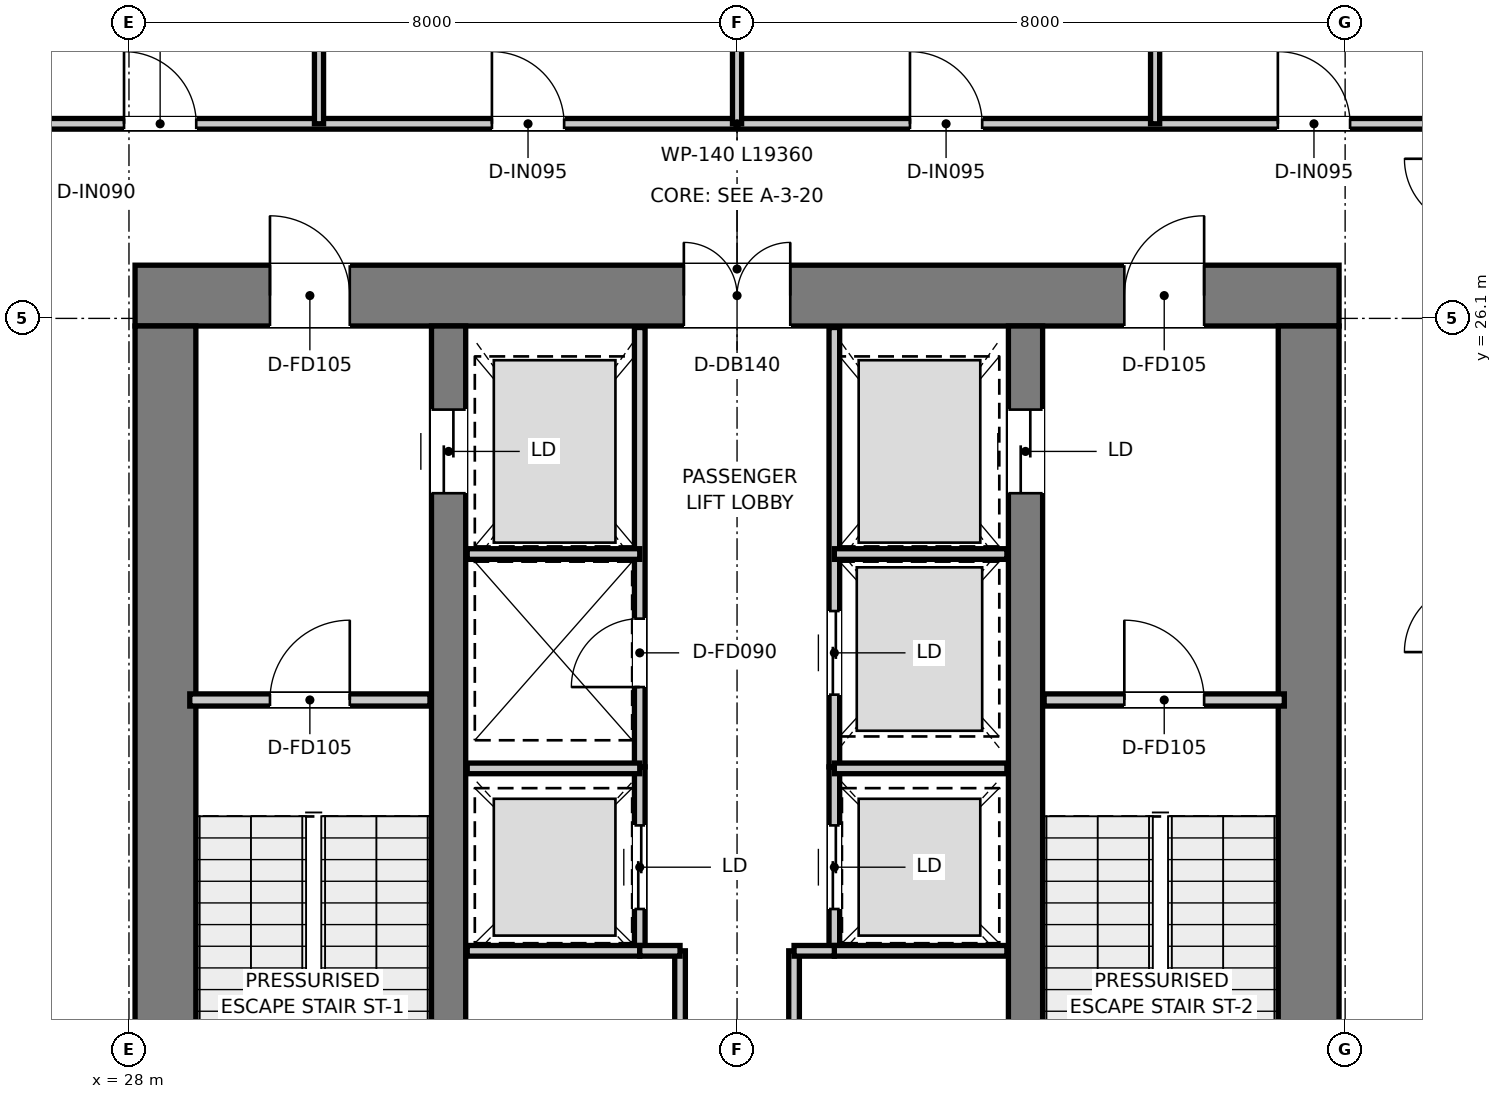
"""IFC4 building model, lengths in metres.
Left out: names, types, materials, properties, quantities, classifications, styles, units other than length and angle.
Written with IfcOpenShell. Run it as: python <this file> out.ifc"""

import sys

from ifc_helpers import new_model, si_unit, direction, frame, frame_2d, origin, place, context, subcontext, project, spatial, rectangle, extrude, element, fill, save


model = new_model("IFC4")
c1 = context("Model", 3, precision=1e-05, world=origin(), true_north=direction((0.0, 1.0)))
c2 = subcontext(c1, "Body", "Model", "MODEL_VIEW")
j1 = project(units=[si_unit("LENGTHUNIT", "METRE"), si_unit("PLANEANGLEUNIT", "RADIAN")], contexts=[c1])
p1 = place(None, origin())
s1 = spatial("IfcSite", under=j1, at=p1, CompositionType="ELEMENT")
p2 = place(p1, origin())
s2 = spatial("IfcBuilding", under=s1, at=p2, CompositionType="ELEMENT")
p3 = place(p2, frame((0.0, 0.0, 302.95)))
s3 = spatial("IfcBuildingStorey", under=s2, at=p3, CompositionType="ELEMENT", Elevation=302.95)
p4 = place(p3, frame((28.08, 26.4, 0.0), z_axis=(0.0, 0.0, 1.0), x_axis=(1.0, 0.0, 0.0)))
e1 = element("IfcWall", 1, at=p4, inside=s3, PredefinedType="SHEAR", context=c2, shape_type="SweptSolid", body=[
    extrude(rectangle(XDim=15.84, YDim=0.8, at=frame_2d((7.92, 0.0))), origin(), (0.0, 0.0, 1.0), 3.95),
])
p5 = place(p4, frame((7.22, 0.0, 0.0)))
e2 = element("IfcOpeningElement", 2, at=p5, cuts=e1, PredefinedType="OPENING", context=c2, shape_type="SweptSolid", body=[
    extrude(rectangle(XDim=1.4, YDim=2.2, at=frame_2d((0.7, 1.1))), frame((0.0, 0.41, 0.0), z_axis=(0.0, -1.0, 0.0), x_axis=(1.0, 0.0, 0.0)), (0.0, 0.0, 1.0), 0.82),
])
p6 = place(p4, frame((1.775, 0.0, 0.0)))
e3 = element("IfcOpeningElement", 3, at=p6, cuts=e1, PredefinedType="OPENING", context=c2, shape_type="SweptSolid", body=[
    extrude(rectangle(XDim=1.05, YDim=2.1, at=frame_2d((0.525, 1.05))), frame((0.0, 0.41, 0.0), z_axis=(0.0, -1.0, 0.0), x_axis=(1.0, 0.0, 0.0)), (0.0, 0.0, 1.0), 0.82),
])
p7 = place(p4, frame((13.015, 0.0, 0.0)))
e4 = element("IfcOpeningElement", 4, at=p7, cuts=e1, PredefinedType="OPENING", context=c2, shape_type="SweptSolid", body=[
    extrude(rectangle(XDim=1.05, YDim=2.1, at=frame_2d((0.525, 1.05))), frame((0.0, 0.41, 0.0), z_axis=(0.0, -1.0, 0.0), x_axis=(1.0, 0.0, 0.0)), (0.0, 0.0, 1.0), 0.82),
])
for number, where, z_axis, x_axis in (
    (5, (28.48, 11.3, 0.0), (0.0, 0.0, 1.0), (0.0, 1.0, 0.0)),
    (6, (43.52, 11.3, 0.0), (0.0, 0.0, 1.0), (0.0, 1.0, 0.0)),
):
    element("IfcWall", number, at=place(p3, frame(where, z_axis=z_axis, x_axis=x_axis)), inside=s3, PredefinedType="SHEAR", context=c2, shape_type="SweptSolid", body=[
        extrude(rectangle(XDim=14.7, YDim=0.8, at=frame_2d((7.35, 0.0))), origin(), (0.0, 0.0, 1.0), 3.95),
    ])
p8 = place(p3, frame((32.205, 13.22, 0.0), z_axis=(0.0, 0.0, 1.0), x_axis=(0.0, 1.0, 0.0)))
e7 = element("IfcWall", 7, at=p8, inside=s3, PredefinedType="SHEAR", context=c2, shape_type="SweptSolid", body=[
    extrude(rectangle(XDim=12.78, YDim=0.45, at=frame_2d((6.39, 0.0))), origin(), (0.0, 0.0, 1.0), 3.95),
])
p9 = place(p8, frame((10.58, 0.0, 0.0)))
e8 = element("IfcOpeningElement", 8, at=p9, cuts=e7, PredefinedType="OPENING", context=c2, shape_type="SweptSolid", body=[
    extrude(rectangle(XDim=1.1, YDim=2.15, at=frame_2d((0.55, 1.075))), frame((0.0, 0.235, 0.0), z_axis=(0.0, -1.0, 0.0), x_axis=(1.0, 0.0, 0.0)), (0.0, 0.0, 1.0), 0.47),
])
p10 = place(p3, frame((39.795, 13.22, 0.0), z_axis=(0.0, 0.0, 1.0), x_axis=(0.0, 1.0, 0.0)))
e9 = element("IfcWall", 9, at=p10, inside=s3, PredefinedType="SHEAR", context=c2, shape_type="SweptSolid", body=[
    extrude(rectangle(XDim=12.78, YDim=0.45, at=frame_2d((6.39, 0.0))), origin(), (0.0, 0.0, 1.0), 3.95),
])
p11 = place(p10, frame((10.58, 0.0, 0.0)))
e10 = element("IfcOpeningElement", 10, at=p11, cuts=e9, PredefinedType="OPENING", context=c2, shape_type="SweptSolid", body=[
    extrude(rectangle(XDim=1.1, YDim=2.15, at=frame_2d((0.55, 1.075))), frame((0.0, 0.235, 0.0), z_axis=(0.0, -1.0, 0.0), x_axis=(1.0, 0.0, 0.0)), (0.0, 0.0, 1.0), 0.47),
])
p12 = place(p3, frame((28.8, 21.08, 0.0), z_axis=(0.0, 0.0, 1.0), x_axis=(1.0, 0.0, 0.0)))
e11 = element("IfcWall", 11, at=p12, inside=s3, PredefinedType="PARTITIONING", context=c2, shape_type="SweptSolid", body=[
    extrude(rectangle(XDim=3.16, YDim=0.16, at=frame_2d((1.58, 0.0))), origin(), (0.0, 0.0, 1.0), 3.67),
])
p13 = place(p12, frame((1.055, 0.0, 0.0)))
e12 = element("IfcOpeningElement", 12, at=p13, cuts=e11, PredefinedType="OPENING", context=c2, shape_type="SweptSolid", body=[
    extrude(rectangle(XDim=1.05, YDim=2.1, at=frame_2d((0.525, 1.05))), frame((0.0, 0.09, 0.0), z_axis=(0.0, -1.0, 0.0), x_axis=(1.0, 0.0, 0.0)), (0.0, 0.0, 1.0), 0.18),
])
p14 = place(p3, frame((40.04, 21.08, 0.0), z_axis=(0.0, 0.0, 1.0), x_axis=(1.0, 0.0, 0.0)))
e13 = element("IfcWall", 13, at=p14, inside=s3, PredefinedType="PARTITIONING", context=c2, shape_type="SweptSolid", body=[
    extrude(rectangle(XDim=3.16, YDim=0.16, at=frame_2d((1.58, 0.0))), origin(), (0.0, 0.0, 1.0), 3.67),
])
p15 = place(p14, frame((1.055, 0.0, 0.0)))
e14 = element("IfcOpeningElement", 14, at=p15, cuts=e13, PredefinedType="OPENING", context=c2, shape_type="SweptSolid", body=[
    extrude(rectangle(XDim=1.05, YDim=2.1, at=frame_2d((0.525, 1.05))), frame((0.0, 0.09, 0.0), z_axis=(0.0, -1.0, 0.0), x_axis=(1.0, 0.0, 0.0)), (0.0, 0.0, 1.0), 0.18),
])
p16 = place(p3, frame((34.72, 20.2, 0.0), z_axis=(0.0, 0.0, 1.0), x_axis=(0.0, 1.0, 0.0)))
e15 = element("IfcWall", 15, at=p16, inside=s3, PredefinedType="PARTITIONING", context=c2, shape_type="SweptSolid", body=[
    extrude(rectangle(XDim=5.78, YDim=0.14, at=frame_2d((2.89, 0.0))), origin(), (0.0, 0.0, 1.0), 2.82),
])
p17 = place(p16, frame((1.05, 0.0, 0.0)))
e16 = element("IfcOpeningElement", 16, at=p17, cuts=e15, PredefinedType="OPENING", context=c2, shape_type="SweptSolid", body=[
    extrude(rectangle(XDim=0.9, YDim=2.1, at=frame_2d((0.45, 1.05))), frame((0.0, 0.08, 0.0), z_axis=(0.0, -1.0, 0.0), x_axis=(1.0, 0.0, 0.0)), (0.0, 0.0, 1.0), 0.16),
])
p18 = place(p3, frame((37.28, 20.2, 0.0), z_axis=(0.0, 0.0, 1.0), x_axis=(0.0, 1.0, 0.0)))
e17 = element("IfcWall", 17, at=p18, inside=s3, PredefinedType="PARTITIONING", context=c2, shape_type="SweptSolid", body=[
    extrude(rectangle(XDim=5.78, YDim=0.14, at=frame_2d((2.89, 0.0))), origin(), (0.0, 0.0, 1.0), 2.82),
])
p19 = place(p18, frame((0.95, 0.0, 0.0)))
e18 = element("IfcOpeningElement", 18, at=p19, cuts=e17, PredefinedType="OPENING", context=c2, shape_type="SweptSolid", body=[
    extrude(rectangle(XDim=1.1, YDim=2.15, at=frame_2d((0.55, 1.075))), frame((0.0, 0.08, 0.0), z_axis=(0.0, -1.0, 0.0), x_axis=(1.0, 0.0, 0.0)), (0.0, 0.0, 1.0), 0.16),
])
for number, where, z_axis, x_axis in (
    (19, (32.45, 23.0, 0.0), (0.0, 0.0, 1.0), (1.0, 0.0, 0.0)),
    (20, (37.28, 23.0, 0.0), (0.0, 0.0, 1.0), (1.0, 0.0, 0.0)),
):
    element("IfcWall", number, at=place(p3, frame(where, z_axis=z_axis, x_axis=x_axis)), inside=s3, PredefinedType="PARTITIONING", context=c2, shape_type="SweptSolid", body=[
        extrude(rectangle(XDim=2.27, YDim=0.14, at=frame_2d((1.135, 0.0))), origin(), (0.0, 0.0, 1.0), 2.82),
    ])
p20 = place(p3, frame((34.72, 17.78, 0.0), z_axis=(0.0, 0.0, 1.0), x_axis=(0.0, 1.0, 0.0)))
e21 = element("IfcWall", 21, at=p20, inside=s3, PredefinedType="PARTITIONING", context=c2, shape_type="SweptSolid", body=[
    extrude(rectangle(XDim=2.42, YDim=0.14, at=frame_2d((1.21, 0.0))), origin(), (0.0, 0.0, 1.0), 3.67),
])
p21 = place(p20, frame((0.55, 0.0, 0.0)))
e22 = element("IfcOpeningElement", 22, at=p21, cuts=e21, PredefinedType="OPENING", context=c2, shape_type="SweptSolid", body=[
    extrude(rectangle(XDim=1.1, YDim=2.15, at=frame_2d((0.55, 1.075))), frame((0.0, 0.08, 0.0), z_axis=(0.0, -1.0, 0.0), x_axis=(1.0, 0.0, 0.0)), (0.0, 0.0, 1.0), 0.16),
])
p22 = place(p3, frame((37.28, 17.78, 0.0), z_axis=(0.0, 0.0, 1.0), x_axis=(0.0, 1.0, 0.0)))
e23 = element("IfcWall", 23, at=p22, inside=s3, PredefinedType="PARTITIONING", context=c2, shape_type="SweptSolid", body=[
    extrude(rectangle(XDim=2.42, YDim=0.14, at=frame_2d((1.21, 0.0))), origin(), (0.0, 0.0, 1.0), 3.67),
])
p23 = place(p22, frame((0.55, 0.0, 0.0)))
e24 = element("IfcOpeningElement", 24, at=p23, cuts=e23, PredefinedType="OPENING", context=c2, shape_type="SweptSolid", body=[
    extrude(rectangle(XDim=1.1, YDim=2.15, at=frame_2d((0.55, 1.075))), frame((0.0, 0.08, 0.0), z_axis=(0.0, -1.0, 0.0), x_axis=(1.0, 0.0, 0.0)), (0.0, 0.0, 1.0), 0.16),
])
for number, where, z_axis, x_axis in (
    (25, (32.45, 17.78, 0.0), (0.0, 0.0, 1.0), (1.0, 0.0, 0.0)),
    (26, (32.45, 20.18, 0.0), (0.0, 0.0, 1.0), (1.0, 0.0, 0.0)),
    (27, (37.28, 17.78, 0.0), (0.0, 0.0, 1.0), (1.0, 0.0, 0.0)),
    (28, (37.28, 20.18, 0.0), (0.0, 0.0, 1.0), (1.0, 0.0, 0.0)),
):
    element("IfcWall", number, at=place(p3, frame(where, z_axis=z_axis, x_axis=x_axis)), inside=s3, PredefinedType="PARTITIONING", context=c2, shape_type="SweptSolid", body=[
        extrude(rectangle(XDim=2.27, YDim=0.14, at=frame_2d((1.135, 0.0))), origin(), (0.0, 0.0, 1.0), 3.67),
    ])
p24 = place(p3, frame((35.25, 13.22, 0.0), z_axis=(0.0, 0.0, 1.0), x_axis=(0.0, 1.0, 0.0)))
e29 = element("IfcWall", 29, at=p24, inside=s3, PredefinedType="PARTITIONING", context=c2, shape_type="SweptSolid", body=[
    extrude(rectangle(XDim=4.56, YDim=0.14, at=frame_2d((2.28, 0.0))), origin(), (0.0, 0.0, 1.0), 3.67),
])
p25 = place(p24, frame((1.93, 0.0, 0.0)))
e30 = element("IfcOpeningElement", 30, at=p25, cuts=e29, PredefinedType="OPENING", context=c2, shape_type="SweptSolid", body=[
    extrude(rectangle(XDim=0.9, YDim=2.1, at=frame_2d((0.45, 1.05))), frame((0.0, 0.08, 0.0), z_axis=(0.0, -1.0, 0.0), x_axis=(1.0, 0.0, 0.0)), (0.0, 0.0, 1.0), 0.16),
])
p26 = place(p3, frame((34.72, 17.78, 0.0), z_axis=(0.0, 0.0, 1.0), x_axis=(1.0, 0.0, 0.0)))
e31 = element("IfcWall", 31, at=p26, inside=s3, PredefinedType="PARTITIONING", context=c2, shape_type="SweptSolid", body=[
    extrude(rectangle(XDim=0.53, YDim=0.14, at=frame_2d((0.265, 0.0))), origin(), (0.0, 0.0, 1.0), 3.67),
])
p27 = place(p3, frame((36.75, 13.22, 0.0), z_axis=(0.0, 0.0, 1.0), x_axis=(0.0, 1.0, 0.0)))
e32 = element("IfcWall", 32, at=p27, inside=s3, PredefinedType="PARTITIONING", context=c2, shape_type="SweptSolid", body=[
    extrude(rectangle(XDim=4.56, YDim=0.14, at=frame_2d((2.28, 0.0))), origin(), (0.0, 0.0, 1.0), 3.67),
])
p28 = place(p27, frame((1.93, 0.0, 0.0)))
e33 = element("IfcOpeningElement", 33, at=p28, cuts=e32, PredefinedType="OPENING", context=c2, shape_type="SweptSolid", body=[
    extrude(rectangle(XDim=0.9, YDim=2.1, at=frame_2d((0.45, 1.05))), frame((0.0, 0.08, 0.0), z_axis=(0.0, -1.0, 0.0), x_axis=(1.0, 0.0, 0.0)), (0.0, 0.0, 1.0), 0.16),
])
p29 = place(p3, frame((36.75, 17.78, 0.0), z_axis=(0.0, 0.0, 1.0), x_axis=(1.0, 0.0, 0.0)))
e34 = element("IfcWall", 34, at=p29, inside=s3, PredefinedType="PARTITIONING", context=c2, shape_type="SweptSolid", body=[
    extrude(rectangle(XDim=0.53, YDim=0.14, at=frame_2d((0.265, 0.0))), origin(), (0.0, 0.0, 1.0), 3.67),
])
p30 = place(p3, frame((26.32, 28.66, 0.0), z_axis=(0.0, 0.0, 1.0), x_axis=(1.0, 0.0, 0.0)))
e35 = element("IfcWall", 35, at=p30, inside=s3, PredefinedType="PARTITIONING", context=c2, shape_type="SweptSolid", body=[
    extrude(rectangle(XDim=19.36, YDim=0.14, at=frame_2d((9.68, 0.0))), origin(), (0.0, 0.0, 1.0), 3.18),
])
p31 = place(p30, frame((1.615, 0.0, 0.0)))
e36 = element("IfcOpeningElement", 36, at=p31, cuts=e35, PredefinedType="OPENING", context=c2, shape_type="SweptSolid", body=[
    extrude(rectangle(XDim=0.95, YDim=2.1, at=frame_2d((0.475, 1.05))), frame((0.0, 0.08, 0.0), z_axis=(0.0, -1.0, 0.0), x_axis=(1.0, 0.0, 0.0)), (0.0, 0.0, 1.0), 0.16),
])
p32 = place(p30, frame((6.455, 0.0, 0.0)))
e37 = element("IfcOpeningElement", 37, at=p32, cuts=e35, PredefinedType="OPENING", context=c2, shape_type="SweptSolid", body=[
    extrude(rectangle(XDim=0.95, YDim=2.1, at=frame_2d((0.475, 1.05))), frame((0.0, 0.08, 0.0), z_axis=(0.0, -1.0, 0.0), x_axis=(1.0, 0.0, 0.0)), (0.0, 0.0, 1.0), 0.16),
])
p33 = place(p30, frame((11.955, 0.0, 0.0)))
e38 = element("IfcOpeningElement", 38, at=p33, cuts=e35, PredefinedType="OPENING", context=c2, shape_type="SweptSolid", body=[
    extrude(rectangle(XDim=0.95, YDim=2.1, at=frame_2d((0.475, 1.05))), frame((0.0, 0.08, 0.0), z_axis=(0.0, -1.0, 0.0), x_axis=(1.0, 0.0, 0.0)), (0.0, 0.0, 1.0), 0.16),
])
p34 = place(p30, frame((16.795, 0.0, 0.0)))
e39 = element("IfcOpeningElement", 39, at=p34, cuts=e35, PredefinedType="OPENING", context=c2, shape_type="SweptSolid", body=[
    extrude(rectangle(XDim=0.95, YDim=2.1, at=frame_2d((0.475, 1.05))), frame((0.0, 0.08, 0.0), z_axis=(0.0, -1.0, 0.0), x_axis=(1.0, 0.0, 0.0)), (0.0, 0.0, 1.0), 0.16),
])
p35 = place(p3, frame((30.5, 28.66, 0.0), z_axis=(0.0, 0.0, 1.0), x_axis=(0.0, 1.0, 0.0)))
e40 = element("IfcWall", 40, at=p35, inside=s3, PredefinedType="PARTITIONING", context=c2, shape_type="SweptSolid", body=[
    extrude(rectangle(XDim=17.243, YDim=0.12, at=frame_2d((8.622, 0.0))), origin(), (0.0, 0.0, 1.0), 3.13),
])
p36 = place(p3, frame((36.0, 28.66, 0.0), z_axis=(0.0, 0.0, 1.0), x_axis=(0.0, 1.0, 0.0)))
e41 = element("IfcWall", 41, at=p36, inside=s3, PredefinedType="PARTITIONING", context=c2, shape_type="SweptSolid", body=[
    extrude(rectangle(XDim=20.214, YDim=0.12, at=frame_2d((10.107, 0.0))), origin(), (0.0, 0.0, 1.0), 3.13),
])
p37 = place(p3, frame((41.5, 28.66, 0.0), z_axis=(0.0, 0.0, 1.0), x_axis=(0.0, 1.0, 0.0)))
e42 = element("IfcWall", 42, at=p37, inside=s3, PredefinedType="PARTITIONING", context=c2, shape_type="SweptSolid", body=[
    extrude(rectangle(XDim=17.474, YDim=0.12, at=frame_2d((8.737, 0.0))), origin(), (0.0, 0.0, 1.0), 3.13),
])
p38 = place(p13, origin())
e43 = element("IfcDoor", 43, at=p38, inside=s3, OperationType="SINGLE_SWING_RIGHT", PredefinedType="DOOR", context=c2, shape_type="SweptSolid", body=[
    extrude(rectangle(XDim=1.05, YDim=2.1, at=frame_2d((0.525, 1.05))), frame((0.0, 0.025, 0.0), z_axis=(0.0, -1.0, 0.0), x_axis=(1.0, 0.0, 0.0)), (0.0, 0.0, 1.0), 0.05),
])
fill(e12, e43)
p39 = place(p15, origin())
e44 = element("IfcDoor", 44, at=p39, inside=s3, OperationType="SINGLE_SWING_LEFT", PredefinedType="DOOR", context=c2, shape_type="SweptSolid", body=[
    extrude(rectangle(XDim=1.05, YDim=2.1, at=frame_2d((0.525, 1.05))), frame((0.0, 0.025, 0.0), z_axis=(0.0, -1.0, 0.0), x_axis=(1.0, 0.0, 0.0)), (0.0, 0.0, 1.0), 0.05),
])
fill(e14, e44)
p40 = place(p5, origin())
e45 = element("IfcDoor", 45, at=p40, inside=s3, OperationType="DOUBLE_DOOR_SINGLE_SWING", PredefinedType="DOOR", context=c2, shape_type="SweptSolid", body=[
    extrude(rectangle(XDim=1.4, YDim=2.2, at=frame_2d((0.7, 1.1))), frame((0.0, 0.025, 0.0), z_axis=(0.0, -1.0, 0.0), x_axis=(1.0, 0.0, 0.0)), (0.0, 0.0, 1.0), 0.05),
])
fill(e2, e45)
p41 = place(p6, origin())
e46 = element("IfcDoor", 46, at=p41, inside=s3, OperationType="SINGLE_SWING_LEFT", PredefinedType="DOOR", context=c2, shape_type="SweptSolid", body=[
    extrude(rectangle(XDim=1.05, YDim=2.1, at=frame_2d((0.525, 1.05))), frame((0.0, 0.025, 0.0), z_axis=(0.0, -1.0, 0.0), x_axis=(1.0, 0.0, 0.0)), (0.0, 0.0, 1.0), 0.05),
])
fill(e3, e46)
p42 = place(p7, origin())
e47 = element("IfcDoor", 47, at=p42, inside=s3, OperationType="SINGLE_SWING_RIGHT", PredefinedType="DOOR", context=c2, shape_type="SweptSolid", body=[
    extrude(rectangle(XDim=1.05, YDim=2.1, at=frame_2d((0.525, 1.05))), frame((0.0, 0.025, 0.0), z_axis=(0.0, -1.0, 0.0), x_axis=(1.0, 0.0, 0.0)), (0.0, 0.0, 1.0), 0.05),
])
fill(e4, e47)
p43 = place(p9, origin())
e48 = element("IfcDoor", 48, at=p43, inside=s3, OperationType="DOUBLE_DOOR_SLIDING", PredefinedType="DOOR", context=c2, shape_type="SweptSolid", body=[
    extrude(rectangle(XDim=1.1, YDim=2.15, at=frame_2d((0.55, 1.075))), frame((0.0, 0.025, 0.0), z_axis=(0.0, -1.0, 0.0), x_axis=(1.0, 0.0, 0.0)), (0.0, 0.0, 1.0), 0.05),
])
fill(e8, e48)
p44 = place(p11, origin())
e49 = element("IfcDoor", 49, at=p44, inside=s3, OperationType="DOUBLE_DOOR_SLIDING", PredefinedType="DOOR", context=c2, shape_type="SweptSolid", body=[
    extrude(rectangle(XDim=1.1, YDim=2.15, at=frame_2d((0.55, 1.075))), frame((0.0, 0.025, 0.0), z_axis=(0.0, -1.0, 0.0), x_axis=(1.0, 0.0, 0.0)), (0.0, 0.0, 1.0), 0.05),
])
fill(e10, e49)
p45 = place(p17, origin())
e50 = element("IfcDoor", 50, at=p45, inside=s3, OperationType="SINGLE_SWING_LEFT", PredefinedType="DOOR", context=c2, shape_type="SweptSolid", body=[
    extrude(rectangle(XDim=0.9, YDim=2.1, at=frame_2d((0.45, 1.05))), frame((0.0, 0.025, 0.0), z_axis=(0.0, -1.0, 0.0), x_axis=(1.0, 0.0, 0.0)), (0.0, 0.0, 1.0), 0.05),
])
fill(e16, e50)
p46 = place(p19, origin())
e51 = element("IfcDoor", 51, at=p46, inside=s3, OperationType="DOUBLE_DOOR_SLIDING", PredefinedType="DOOR", context=c2, shape_type="SweptSolid", body=[
    extrude(rectangle(XDim=1.1, YDim=2.15, at=frame_2d((0.55, 1.075))), frame((0.0, 0.025, 0.0), z_axis=(0.0, -1.0, 0.0), x_axis=(1.0, 0.0, 0.0)), (0.0, 0.0, 1.0), 0.05),
])
fill(e18, e51)
p47 = place(p21, origin())
e52 = element("IfcDoor", 52, at=p47, inside=s3, OperationType="DOUBLE_DOOR_SLIDING", PredefinedType="DOOR", context=c2, shape_type="SweptSolid", body=[
    extrude(rectangle(XDim=1.1, YDim=2.15, at=frame_2d((0.55, 1.075))), frame((0.0, 0.025, 0.0), z_axis=(0.0, -1.0, 0.0), x_axis=(1.0, 0.0, 0.0)), (0.0, 0.0, 1.0), 0.05),
])
fill(e22, e52)
p48 = place(p23, origin())
e53 = element("IfcDoor", 53, at=p48, inside=s3, OperationType="DOUBLE_DOOR_SLIDING", PredefinedType="DOOR", context=c2, shape_type="SweptSolid", body=[
    extrude(rectangle(XDim=1.1, YDim=2.15, at=frame_2d((0.55, 1.075))), frame((0.0, 0.025, 0.0), z_axis=(0.0, -1.0, 0.0), x_axis=(1.0, 0.0, 0.0)), (0.0, 0.0, 1.0), 0.05),
])
fill(e24, e53)
p49 = place(p31, origin())
e54 = element("IfcDoor", 54, at=p49, inside=s3, OperationType="SINGLE_SWING_LEFT", PredefinedType="DOOR", context=c2, shape_type="SweptSolid", body=[
    extrude(rectangle(XDim=0.95, YDim=2.1, at=frame_2d((0.475, 1.05))), frame((0.0, 0.025, 0.0), z_axis=(0.0, -1.0, 0.0), x_axis=(1.0, 0.0, 0.0)), (0.0, 0.0, 1.0), 0.05),
])
fill(e36, e54)
p50 = place(p32, origin())
e55 = element("IfcDoor", 55, at=p50, inside=s3, OperationType="SINGLE_SWING_LEFT", PredefinedType="DOOR", context=c2, shape_type="SweptSolid", body=[
    extrude(rectangle(XDim=0.95, YDim=2.1, at=frame_2d((0.475, 1.05))), frame((0.0, 0.025, 0.0), z_axis=(0.0, -1.0, 0.0), x_axis=(1.0, 0.0, 0.0)), (0.0, 0.0, 1.0), 0.05),
])
fill(e37, e55)
p51 = place(p33, origin())
e56 = element("IfcDoor", 56, at=p51, inside=s3, OperationType="SINGLE_SWING_LEFT", PredefinedType="DOOR", context=c2, shape_type="SweptSolid", body=[
    extrude(rectangle(XDim=0.95, YDim=2.1, at=frame_2d((0.475, 1.05))), frame((0.0, 0.025, 0.0), z_axis=(0.0, -1.0, 0.0), x_axis=(1.0, 0.0, 0.0)), (0.0, 0.0, 1.0), 0.05),
])
fill(e38, e56)
p52 = place(p34, origin())
e57 = element("IfcDoor", 57, at=p52, inside=s3, OperationType="SINGLE_SWING_LEFT", PredefinedType="DOOR", context=c2, shape_type="SweptSolid", body=[
    extrude(rectangle(XDim=0.95, YDim=2.1, at=frame_2d((0.475, 1.05))), frame((0.0, 0.025, 0.0), z_axis=(0.0, -1.0, 0.0), x_axis=(1.0, 0.0, 0.0)), (0.0, 0.0, 1.0), 0.05),
])
fill(e39, e57)
save(model, sys.argv[1])
